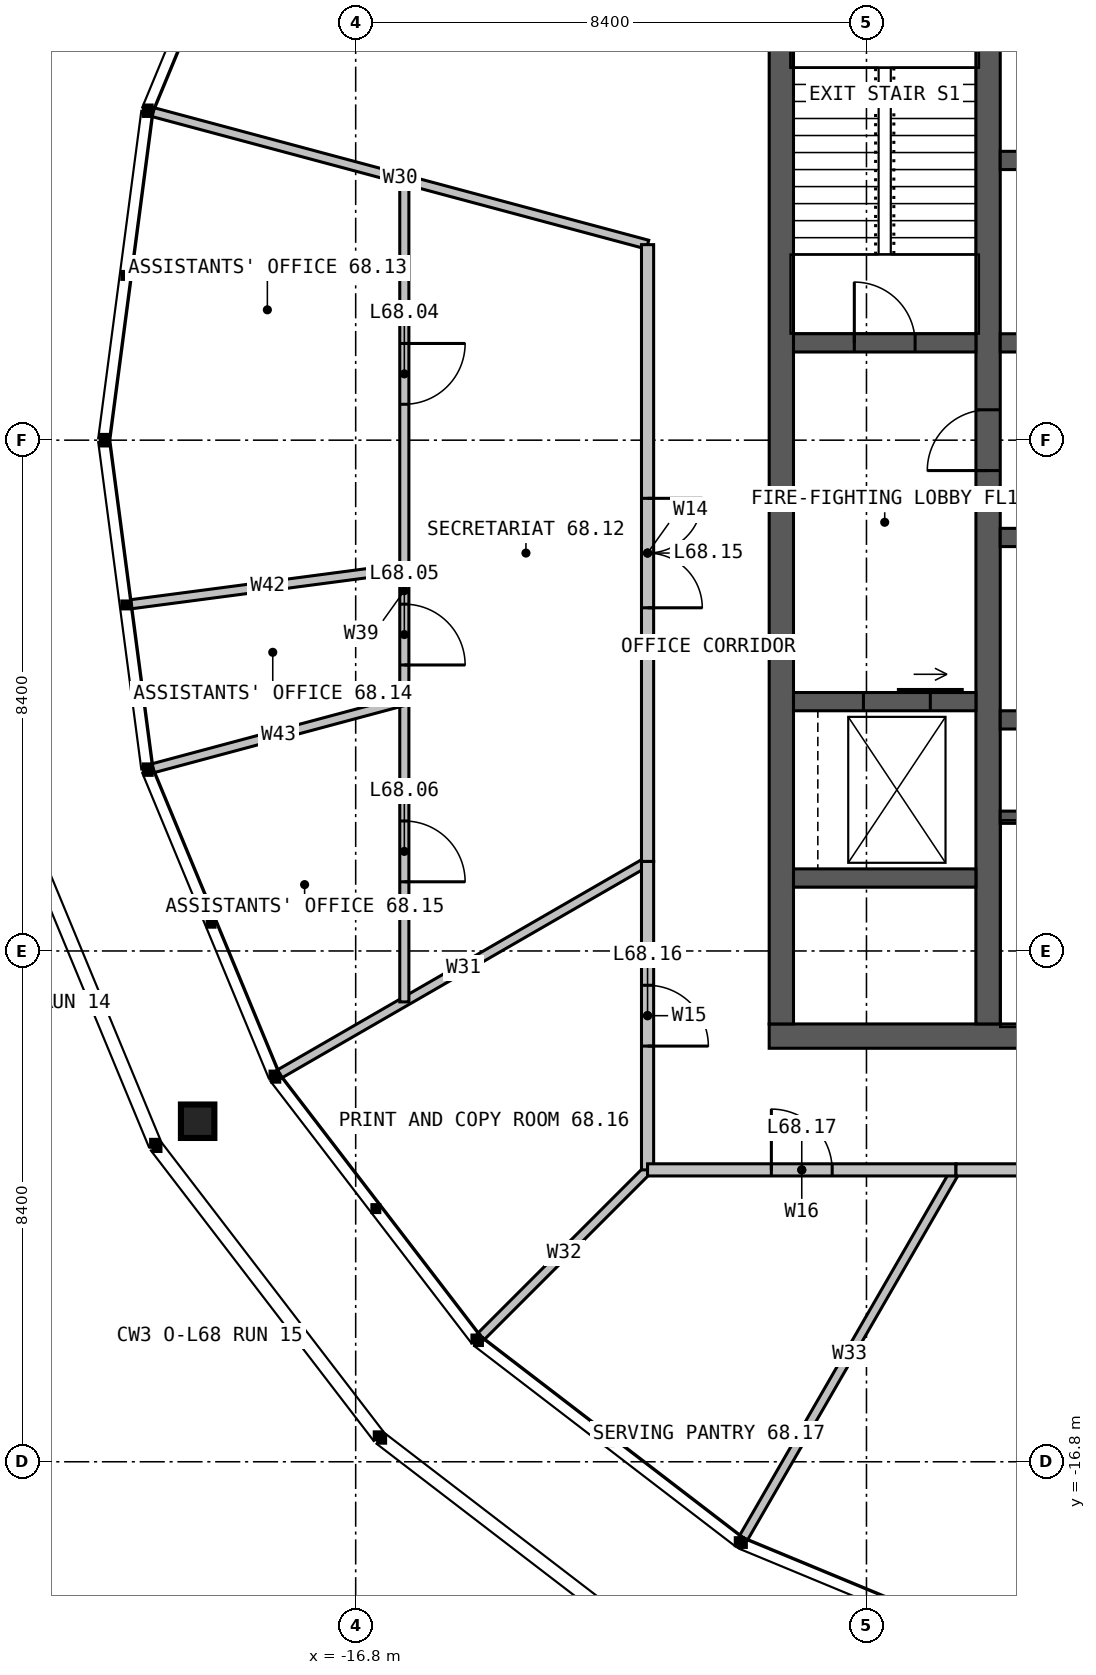
"""IFC4 building model, lengths in metres.
Left out: names, types, materials, properties, quantities, classifications, styles, units other than length and angle.
Written with IfcOpenShell. Run it as: python <this file> out.ifc"""

import sys

from ifc_helpers import new_model, si_unit, direction, frame, frame_2d, origin, origin_2d, place, context, subcontext, project, spatial, rectangle, hollow_rectangle, extrude, element, fill, save


model = new_model("IFC4")
c1 = context("Model", 3, precision=1e-05, world=origin(), true_north=direction((0.0, 1.0)))
c2 = subcontext(c1, "Body", "Model", "MODEL_VIEW")
j1 = project(units=[si_unit("LENGTHUNIT", "METRE"), si_unit("PLANEANGLEUNIT", "RADIAN")], contexts=[c1])
p1 = place(None, origin())
s1 = spatial("IfcSite", under=j1, at=p1, CompositionType="ELEMENT")
p2 = place(p1, origin())
s2 = spatial("IfcBuilding", under=s1, at=p2, CompositionType="ELEMENT")
p3 = place(p2, frame((0.0, 0.0, 280.0)))
s3 = spatial("IfcBuildingStorey", under=s2, at=p3, CompositionType="ELEMENT", Elevation=280.0)
p4 = place(p3, frame((10.0, -9.8, 0.0), z_axis=(0.0, 0.0, 1.0), x_axis=(-1.0, 0.0, 0.0)))
e1 = element("IfcWall", 1, at=p4, inside=s3, PredefinedType="SOLIDWALL", context=c2, shape_type="SweptSolid", body=[
    extrude(rectangle(XDim=20.0, YDim=0.4, at=frame_2d((10.0, 0.0))), origin(), (0.0, 0.0, 1.0), 4.0),
])
p5 = place(p4, frame((6.875, 0.0, 0.0)))
e2 = element("IfcOpeningElement", 2, at=p5, cuts=e1, PredefinedType="OPENING", context=c2, shape_type="SweptSolid", body=[
    extrude(rectangle(XDim=1.2, YDim=2.2, at=frame_2d((0.6, 1.1))), frame((0.0, 0.21, 0.0), z_axis=(0.0, -1.0, 0.0), x_axis=(1.0, 0.0, 0.0)), (0.0, 0.0, 1.0), 0.42),
])
p6 = place(p3, frame((-9.8, 9.6, 0.0), z_axis=(0.0, 0.0, 1.0), x_axis=(0.0, -1.0, 0.0)))
e3 = element("IfcWall", 3, at=p6, inside=s3, PredefinedType="SOLIDWALL", context=c2, shape_type="SweptSolid", body=[
    extrude(rectangle(XDim=19.2, YDim=0.4, at=frame_2d((9.6, 0.0))), origin(), (0.0, 0.0, 1.0), 4.0),
])
p7 = place(p3, frame((-6.4, -9.6, 0.0), z_axis=(0.0, 0.0, 1.0), x_axis=(0.0, 1.0, 0.0)))
e4 = element("IfcWall", 4, at=p7, inside=s3, PredefinedType="SOLIDWALL", context=c2, shape_type="SweptSolid", body=[
    extrude(rectangle(XDim=19.2, YDim=0.4, at=frame_2d((9.6, 0.0))), origin(), (0.0, 0.0, 1.0), 4.0),
])
p8 = place(p7, frame((9.1, 0.0, 0.0)))
e5 = element("IfcOpeningElement", 5, at=p8, cuts=e4, PredefinedType="OPENING", context=c2, shape_type="SweptSolid", body=[
    extrude(rectangle(XDim=1.0, YDim=2.2, at=frame_2d((0.5, 1.1))), frame((0.0, 0.21, 0.0), z_axis=(0.0, -1.0, 0.0), x_axis=(1.0, 0.0, 0.0)), (0.0, 0.0, 1.0), 0.42),
])
p9 = place(p3, frame((-6.2, 1.6, 0.0), z_axis=(0.0, 0.0, 1.0), x_axis=(1.0, 0.0, 0.0)))
e6 = element("IfcWall", 6, at=p9, inside=s3, PredefinedType="SOLIDWALL", context=c2, shape_type="SweptSolid", body=[
    extrude(rectangle(XDim=4.85, YDim=0.3, at=frame_2d((2.425, 0.0))), origin(), (0.0, 0.0, 1.0), 4.0),
])
p10 = place(p9, frame((0.625, 0.0, 0.0)))
e7 = element("IfcOpeningElement", 7, at=p10, cuts=e6, PredefinedType="OPENING", context=c2, shape_type="SweptSolid", body=[
    extrude(rectangle(XDim=1.1, YDim=2.2, at=frame_2d((0.55, 1.1))), frame((0.0, 0.16, 0.0), z_axis=(0.0, -1.0, 0.0), x_axis=(1.0, 0.0, 0.0)), (0.0, 0.0, 1.0), 0.32),
])
p11 = place(p9, frame((3.15, 0.0, 0.0)))
e8 = element("IfcOpeningElement", 8, at=p11, cuts=e6, PredefinedType="OPENING", context=c2, shape_type="SweptSolid", body=[
    extrude(rectangle(XDim=1.1, YDim=2.2, at=frame_2d((0.55, 1.1))), frame((0.0, 0.16, 0.0), z_axis=(0.0, -1.0, 0.0), x_axis=(1.0, 0.0, 0.0)), (0.0, 0.0, 1.0), 0.32),
])
p12 = place(p3, frame((-6.2, 4.6, 0.0), z_axis=(0.0, 0.0, 1.0), x_axis=(1.0, 0.0, 0.0)))
e9 = element("IfcWall", 9, at=p12, inside=s3, PredefinedType="SOLIDWALL", context=c2, shape_type="SweptSolid", body=[
    extrude(rectangle(XDim=4.85, YDim=0.3, at=frame_2d((2.425, 0.0))), origin(), (0.0, 0.0, 1.0), 4.0),
])
p13 = place(p3, frame((-6.2, -1.6, 0.0), z_axis=(0.0, 0.0, 1.0), x_axis=(1.0, 0.0, 0.0)))
e10 = element("IfcWall", 10, at=p13, inside=s3, PredefinedType="SOLIDWALL", context=c2, shape_type="SweptSolid", body=[
    extrude(rectangle(XDim=7.4, YDim=0.3, at=frame_2d((3.7, 0.0))), origin(), (0.0, 0.0, 1.0), 4.0),
])
p14 = place(p13, frame((0.675, 0.0, 0.0)))
e11 = element("IfcOpeningElement", 11, at=p14, cuts=e10, PredefinedType="OPENING", context=c2, shape_type="SweptSolid", body=[
    extrude(rectangle(XDim=1.0, YDim=2.2, at=frame_2d((0.5, 1.1))), frame((0.0, 0.16, 0.0), z_axis=(0.0, -1.0, 0.0), x_axis=(1.0, 0.0, 0.0)), (0.0, 0.0, 1.0), 0.32),
])
p15 = place(p13, frame((2.225, 0.0, 0.0)))
e12 = element("IfcOpeningElement", 12, at=p15, cuts=e10, PredefinedType="OPENING", context=c2, shape_type="SweptSolid", body=[
    extrude(rectangle(XDim=1.0, YDim=2.2, at=frame_2d((0.5, 1.1))), frame((0.0, 0.16, 0.0), z_axis=(0.0, -1.0, 0.0), x_axis=(1.0, 0.0, 0.0)), (0.0, 0.0, 1.0), 0.32),
])
p16 = place(p13, frame((3.695, 0.0, 0.0)))
e13 = element("IfcOpeningElement", 13, at=p16, cuts=e10, PredefinedType="OPENING", context=c2, shape_type="SweptSolid", body=[
    extrude(rectangle(XDim=1.0, YDim=2.2, at=frame_2d((0.5, 1.1))), frame((0.0, 0.16, 0.0), z_axis=(0.0, -1.0, 0.0), x_axis=(1.0, 0.0, 0.0)), (0.0, 0.0, 1.0), 0.32),
])
p17 = place(p3, frame((-6.2, -4.6, 0.0), z_axis=(0.0, 0.0, 1.0), x_axis=(1.0, 0.0, 0.0)))
e14 = element("IfcWall", 14, at=p17, inside=s3, PredefinedType="SOLIDWALL", context=c2, shape_type="SweptSolid", body=[
    extrude(rectangle(XDim=7.4, YDim=0.3, at=frame_2d((3.7, 0.0))), origin(), (0.0, 0.0, 1.0), 4.0),
])
p18 = place(p3, frame((-6.2, -6.2, 0.0), z_axis=(0.0, 0.0, 1.0), x_axis=(1.0, 0.0, 0.0)))
e15 = element("IfcWall", 15, at=p18, inside=s3, PredefinedType="SOLIDWALL", context=c2, shape_type="SweptSolid", body=[
    extrude(rectangle(XDim=7.4, YDim=0.2, at=frame_2d((3.7, 0.0))), origin(), (0.0, 0.0, 1.0), 4.0),
])
p19 = place(p3, frame((-9.6, 1.6, 0.0), z_axis=(0.0, 0.0, 1.0), x_axis=(1.0, 0.0, 0.0)))
e16 = element("IfcWall", 16, at=p19, inside=s3, PredefinedType="SOLIDWALL", context=c2, shape_type="SweptSolid", body=[
    extrude(rectangle(XDim=3.0, YDim=0.3, at=frame_2d((1.5, 0.0))), origin(), (0.0, 0.0, 1.0), 4.0),
])
p20 = place(p19, frame((1.0, 0.0, 0.0)))
e17 = element("IfcOpeningElement", 17, at=p20, cuts=e16, PredefinedType="OPENING", context=c2, shape_type="SweptSolid", body=[
    extrude(rectangle(XDim=1.0, YDim=2.2, at=frame_2d((0.5, 1.1))), frame((0.0, 0.16, 0.0), z_axis=(0.0, -1.0, 0.0), x_axis=(1.0, 0.0, 0.0)), (0.0, 0.0, 1.0), 0.32),
])
p21 = place(p3, frame((-9.6, -4.3, 0.0), z_axis=(0.0, 0.0, 1.0), x_axis=(1.0, 0.0, 0.0)))
e18 = element("IfcWall", 18, at=p21, inside=s3, PredefinedType="SOLIDWALL", context=c2, shape_type="SweptSolid", body=[
    extrude(rectangle(XDim=3.0, YDim=0.3, at=frame_2d((1.5, 0.0))), origin(), (0.0, 0.0, 1.0), 4.0),
])
p22 = place(p21, frame((1.15, 0.0, 0.0)))
e19 = element("IfcOpeningElement", 19, at=p22, cuts=e18, PredefinedType="OPENING", context=c2, shape_type="SweptSolid", body=[
    extrude(rectangle(XDim=1.1, YDim=2.2, at=frame_2d((0.55, 1.1))), frame((0.0, 0.16, 0.0), z_axis=(0.0, -1.0, 0.0), x_axis=(1.0, 0.0, 0.0)), (0.0, 0.0, 1.0), 0.32),
])
p23 = place(p3, frame((-9.6, -7.2, 0.0), z_axis=(0.0, 0.0, 1.0), x_axis=(1.0, 0.0, 0.0)))
e20 = element("IfcWall", 20, at=p23, inside=s3, PredefinedType="SOLIDWALL", context=c2, shape_type="SweptSolid", body=[
    extrude(rectangle(XDim=3.0, YDim=0.3, at=frame_2d((1.5, 0.0))), origin(), (0.0, 0.0, 1.0), 4.0),
])
p24 = place(p3, frame((-19.399, -11.2, -0.71), z_axis=(0.0, 0.0, 1.0), x_axis=(1.0, 0.0, 0.0)))
e21 = element("IfcColumn", 21, at=p24, inside=s3, PredefinedType="COLUMN", context=c2, shape_type="SweptSolid", body=[
    extrude(hollow_rectangle(XDim=0.55, YDim=0.55, WallThickness=0.04, at=origin_2d()), origin(), (0.0, 0.0, 1.0), 4.0),
])
p25 = place(p3, frame((-12.0, 3.215, 0.0), z_axis=(0.0, 0.0, 1.0), x_axis=(-0.96592152797, 0.258835086115, 0.0)))
e22 = element("IfcWall", 22, at=p25, inside=s3, PredefinedType="PARTITIONING", context=c2, shape_type="SweptSolid", body=[
    extrude(rectangle(XDim=8.423, YDim=0.15, at=frame_2d((4.211, 0.0))), origin(), (0.0, 0.0, 1.0), 2.7),
])
p26 = place(p3, frame((-12.0, -6.928, 0.0), z_axis=(0.0, 0.0, 1.0), x_axis=(-0.866031452229, -0.49998952364, 0.0)))
e23 = element("IfcWall", 23, at=p26, inside=s3, PredefinedType="PARTITIONING", context=c2, shape_type="SweptSolid", body=[
    extrude(rectangle(XDim=6.99, YDim=0.15, at=frame_2d((3.495, 0.0))), origin(), (0.0, 0.0, 1.0), 2.7),
])
p27 = place(p3, frame((-12.0, -12.0, 0.0), z_axis=(0.0, 0.0, 1.0), x_axis=(-0.707106781187, -0.707106781187, 0.0)))
e24 = element("IfcWall", 24, at=p27, inside=s3, PredefinedType="PARTITIONING", context=c2, shape_type="SweptSolid", body=[
    extrude(rectangle(XDim=3.876, YDim=0.15, at=frame_2d((1.938, 0.0))), origin(), (0.0, 0.0, 1.0), 2.7),
])
p28 = place(p3, frame((-6.928, -12.0, 0.0), z_axis=(0.0, 0.0, 1.0), x_axis=(-0.49998952364, -0.866031452229, 0.0)))
e25 = element("IfcWall", 25, at=p28, inside=s3, PredefinedType="PARTITIONING", context=c2, shape_type="SweptSolid", body=[
    extrude(rectangle(XDim=6.99, YDim=0.15, at=frame_2d((3.495, 0.0))), origin(), (0.0, 0.0, 1.0), 2.79),
])
p29 = place(p3, frame((-16.0, 4.287, 0.0), z_axis=(0.0, 0.0, 1.0), x_axis=(0.0, -1.0, 0.0)))
e26 = element("IfcWall", 26, at=p29, inside=s3, PredefinedType="PARTITIONING", context=c2, shape_type="SweptSolid", body=[
    extrude(rectangle(XDim=13.525, YDim=0.15, at=frame_2d((6.762, 0.0))), origin(), (0.0, 0.0, 1.0), 2.79),
])
p30 = place(p29, frame((2.697, 0.0, 0.0)))
e27 = element("IfcOpeningElement", 27, at=p30, cuts=e26, PredefinedType="OPENING", context=c2, shape_type="SweptSolid", body=[
    extrude(rectangle(XDim=1.0, YDim=2.2, at=frame_2d((0.5, 1.1))), frame((0.0, 0.085, 0.0), z_axis=(0.0, -1.0, 0.0), x_axis=(1.0, 0.0, 0.0)), (0.0, 0.0, 1.0), 0.17),
])
p31 = place(p29, frame((6.984, 0.0, 0.0)))
e28 = element("IfcOpeningElement", 28, at=p31, cuts=e26, PredefinedType="OPENING", context=c2, shape_type="SweptSolid", body=[
    extrude(rectangle(XDim=1.0, YDim=2.2, at=frame_2d((0.5, 1.1))), frame((0.0, 0.085, 0.0), z_axis=(0.0, -1.0, 0.0), x_axis=(1.0, 0.0, 0.0)), (0.0, 0.0, 1.0), 0.17),
])
p32 = place(p29, frame((10.55, 0.0, 0.0)))
e29 = element("IfcOpeningElement", 29, at=p32, cuts=e26, PredefinedType="OPENING", context=c2, shape_type="SweptSolid", body=[
    extrude(rectangle(XDim=1.0, YDim=2.2, at=frame_2d((0.5, 1.1))), frame((0.0, 0.085, 0.0), z_axis=(0.0, -1.0, 0.0), x_axis=(1.0, 0.0, 0.0)), (0.0, 0.0, 1.0), 0.17),
])
p33 = place(p3, frame((-16.0, -2.106, 0.0), z_axis=(0.0, 0.0, 1.0), x_axis=(-0.991443101484, -0.130539559217, 0.0)))
e30 = element("IfcWall", 30, at=p33, inside=s3, PredefinedType="PARTITIONING", context=c2, shape_type="SweptSolid", body=[
    extrude(rectangle(XDim=4.53, YDim=0.15, at=frame_2d((2.265, 0.0))), origin(), (0.0, 0.0, 1.0), 2.79),
])
p34 = place(p3, frame((-16.0, -4.287, 0.0), z_axis=(0.0, 0.0, 1.0), x_axis=(-0.965916236437, -0.258854832266, 0.0)))
e31 = element("IfcWall", 31, at=p34, inside=s3, PredefinedType="PARTITIONING", context=c2, shape_type="SweptSolid", body=[
    extrude(rectangle(XDim=4.282, YDim=0.15, at=frame_2d((2.141, 0.0))), origin(), (0.0, 0.0, 1.0), 2.7),
])
p35 = place(p3, frame((-12.0, 3.215, 0.0), z_axis=(0.0, 0.0, 1.0), x_axis=(0.0, -1.0, 0.0)))
e32 = element("IfcWall", 32, at=p35, inside=s3, PredefinedType="PARTITIONING", context=c2, shape_type="SweptSolid", body=[
    extrude(rectangle(XDim=10.144, YDim=0.2, at=frame_2d((5.072, 0.0))), origin(), (0.0, 0.0, 1.0), 3.7),
])
p36 = place(p35, frame((4.172, 0.0, 0.0)))
e33 = element("IfcOpeningElement", 33, at=p36, cuts=e32, PredefinedType="OPENING", context=c2, shape_type="SweptSolid", body=[
    extrude(rectangle(XDim=1.8, YDim=2.2, at=frame_2d((0.9, 1.1))), frame((0.0, 0.11, 0.0), z_axis=(0.0, -1.0, 0.0), x_axis=(1.0, 0.0, 0.0)), (0.0, 0.0, 1.0), 0.22),
])
p37 = place(p3, frame((-12.0, -6.928, 0.0), z_axis=(0.0, 0.0, 1.0), x_axis=(0.0, -1.0, 0.0)))
e34 = element("IfcWall", 34, at=p37, inside=s3, PredefinedType="PARTITIONING", context=c2, shape_type="SweptSolid", body=[
    extrude(rectangle(XDim=5.072, YDim=0.2, at=frame_2d((2.536, 0.0))), origin(), (0.0, 0.0, 1.0), 3.7),
])
p38 = place(p37, frame((2.036, 0.0, 0.0)))
e35 = element("IfcOpeningElement", 35, at=p38, cuts=e34, PredefinedType="OPENING", context=c2, shape_type="SweptSolid", body=[
    extrude(rectangle(XDim=1.0, YDim=2.2, at=frame_2d((0.5, 1.1))), frame((0.0, 0.11, 0.0), z_axis=(0.0, -1.0, 0.0), x_axis=(1.0, 0.0, 0.0)), (0.0, 0.0, 1.0), 0.22),
])
p39 = place(p3, frame((-12.0, -12.0, 0.0), z_axis=(0.0, 0.0, 1.0), x_axis=(1.0, 0.0, 0.0)))
e36 = element("IfcWall", 36, at=p39, inside=s3, PredefinedType="PARTITIONING", context=c2, shape_type="SweptSolid", body=[
    extrude(rectangle(XDim=5.072, YDim=0.2, at=frame_2d((2.536, 0.0))), origin(), (0.0, 0.0, 1.0), 3.7),
])
p40 = place(p39, frame((2.036, 0.0, 0.0)))
e37 = element("IfcOpeningElement", 37, at=p40, cuts=e36, PredefinedType="OPENING", context=c2, shape_type="SweptSolid", body=[
    extrude(rectangle(XDim=1.0, YDim=2.2, at=frame_2d((0.5, 1.1))), frame((0.0, 0.11, 0.0), z_axis=(0.0, -1.0, 0.0), x_axis=(1.0, 0.0, 0.0)), (0.0, 0.0, 1.0), 0.22),
])
p41 = place(p3, frame((-6.928, -12.0, 0.0), z_axis=(0.0, 0.0, 1.0), x_axis=(1.0, 0.0, 0.0)))
e38 = element("IfcWall", 38, at=p41, inside=s3, PredefinedType="PARTITIONING", context=c2, shape_type="SweptSolid", body=[
    extrude(rectangle(XDim=10.144, YDim=0.2, at=frame_2d((5.072, 0.0))), origin(), (0.0, 0.0, 1.0), 3.7),
])
p42 = place(p41, frame((4.172, 0.0, 0.0)))
e39 = element("IfcOpeningElement", 39, at=p42, cuts=e38, PredefinedType="OPENING", context=c2, shape_type="SweptSolid", body=[
    extrude(rectangle(XDim=1.8, YDim=2.2, at=frame_2d((0.9, 1.1))), frame((0.0, 0.11, 0.0), z_axis=(0.0, -1.0, 0.0), x_axis=(1.0, 0.0, 0.0)), (0.0, 0.0, 1.0), 0.22),
])
p43 = place(p8, origin())
e40 = element("IfcDoor", 40, at=p43, inside=s3, OperationType="SINGLE_SWING_LEFT", PredefinedType="DOOR", context=c2, shape_type="SweptSolid", body=[
    extrude(rectangle(XDim=1.0, YDim=2.2, at=frame_2d((0.5, 1.1))), frame((0.0, 0.025, 0.0), z_axis=(0.0, -1.0, 0.0), x_axis=(1.0, 0.0, 0.0)), (0.0, 0.0, 1.0), 0.05),
])
fill(e5, e40)
p44 = place(p20, origin())
e41 = element("IfcDoor", 41, at=p44, inside=s3, OperationType="SINGLE_SWING_LEFT", PredefinedType="DOOR", context=c2, shape_type="SweptSolid", body=[
    extrude(rectangle(XDim=1.0, YDim=2.2, at=frame_2d((0.5, 1.1))), frame((0.0, 0.025, 0.0), z_axis=(0.0, -1.0, 0.0), x_axis=(1.0, 0.0, 0.0)), (0.0, 0.0, 1.0), 0.05),
])
fill(e17, e41)
p45 = place(p22, origin())
e42 = element("IfcDoor", 42, at=p45, inside=s3, OperationType="SLIDING_TO_LEFT", PredefinedType="DOOR", context=c2, shape_type="SweptSolid", body=[
    extrude(rectangle(XDim=1.1, YDim=2.2, at=frame_2d((0.55, 1.1))), frame((0.0, 0.025, 0.0), z_axis=(0.0, -1.0, 0.0), x_axis=(1.0, 0.0, 0.0)), (0.0, 0.0, 1.0), 0.05),
])
fill(e19, e42)
p46 = place(p30, origin())
e43 = element("IfcDoor", 43, at=p46, inside=s3, OperationType="SINGLE_SWING_LEFT", PredefinedType="DOOR", context=c2, shape_type="SweptSolid", body=[
    extrude(rectangle(XDim=1.0, YDim=2.2, at=frame_2d((0.5, 1.1))), frame((0.0, 0.025, 0.0), z_axis=(0.0, -1.0, 0.0), x_axis=(1.0, 0.0, 0.0)), (0.0, 0.0, 1.0), 0.05),
])
fill(e27, e43)
p47 = place(p31, origin())
e44 = element("IfcDoor", 44, at=p47, inside=s3, OperationType="SINGLE_SWING_RIGHT", PredefinedType="DOOR", context=c2, shape_type="SweptSolid", body=[
    extrude(rectangle(XDim=1.0, YDim=2.2, at=frame_2d((0.5, 1.1))), frame((0.0, 0.025, 0.0), z_axis=(0.0, -1.0, 0.0), x_axis=(1.0, 0.0, 0.0)), (0.0, 0.0, 1.0), 0.05),
])
fill(e28, e44)
p48 = place(p32, origin())
e45 = element("IfcDoor", 45, at=p48, inside=s3, OperationType="SINGLE_SWING_RIGHT", PredefinedType="DOOR", context=c2, shape_type="SweptSolid", body=[
    extrude(rectangle(XDim=1.0, YDim=2.2, at=frame_2d((0.5, 1.1))), frame((0.0, 0.025, 0.0), z_axis=(0.0, -1.0, 0.0), x_axis=(1.0, 0.0, 0.0)), (0.0, 0.0, 1.0), 0.05),
])
fill(e29, e45)
p49 = place(p36, origin())
e46 = element("IfcDoor", 46, at=p49, inside=s3, OperationType="DOUBLE_DOOR_SINGLE_SWING", PredefinedType="DOOR", context=c2, shape_type="SweptSolid", body=[
    extrude(rectangle(XDim=1.8, YDim=2.2, at=frame_2d((0.9, 1.1))), frame((0.0, 0.025, 0.0), z_axis=(0.0, -1.0, 0.0), x_axis=(1.0, 0.0, 0.0)), (0.0, 0.0, 1.0), 0.05),
])
fill(e33, e46)
p50 = place(p38, origin())
e47 = element("IfcDoor", 47, at=p50, inside=s3, OperationType="SINGLE_SWING_RIGHT", PredefinedType="DOOR", context=c2, shape_type="SweptSolid", body=[
    extrude(rectangle(XDim=1.0, YDim=2.2, at=frame_2d((0.5, 1.1))), frame((0.0, 0.025, 0.0), z_axis=(0.0, -1.0, 0.0), x_axis=(1.0, 0.0, 0.0)), (0.0, 0.0, 1.0), 0.05),
])
fill(e35, e47)
p51 = place(p40, origin())
e48 = element("IfcDoor", 48, at=p51, inside=s3, OperationType="SINGLE_SWING_LEFT", PredefinedType="DOOR", context=c2, shape_type="SweptSolid", body=[
    extrude(rectangle(XDim=1.0, YDim=2.2, at=frame_2d((0.5, 1.1))), frame((0.0, 0.025, 0.0), z_axis=(0.0, -1.0, 0.0), x_axis=(1.0, 0.0, 0.0)), (0.0, 0.0, 1.0), 0.05),
])
fill(e37, e48)
save(model, sys.argv[1])
